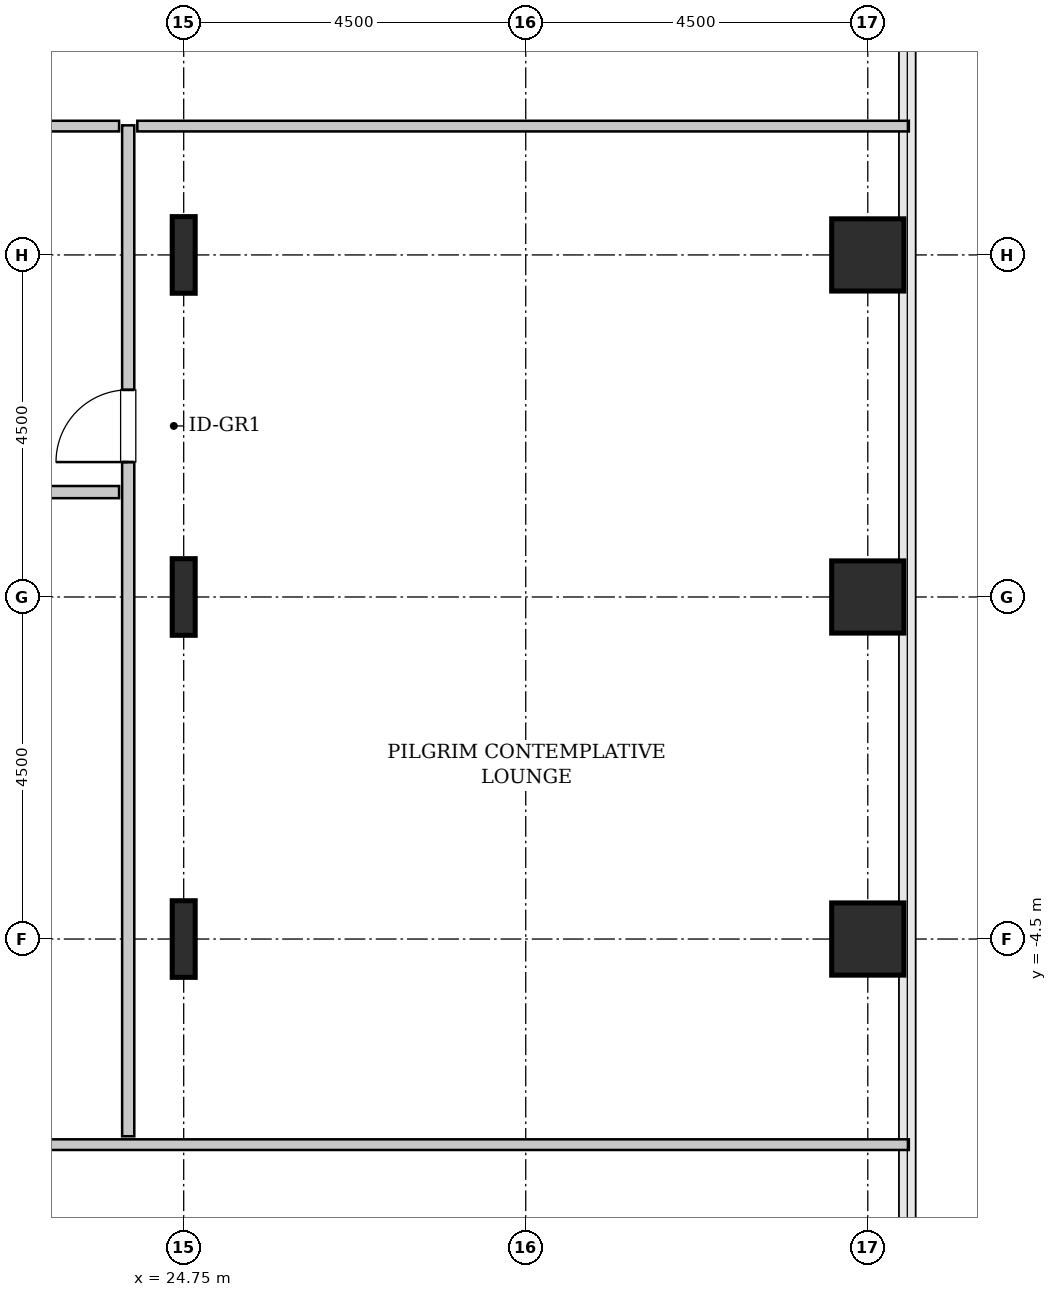
"""IFC4 building model, lengths in metres.
Left out: names, types, materials, properties, quantities, classifications, styles, units other than length and angle.
Written with IfcOpenShell. Run it as: python <this file> out.ifc"""

import sys

from ifc_helpers import new_model, si_unit, direction, frame, frame_2d, origin, origin_2d, place, context, subcontext, project, spatial, rectangle, hollow_rectangle, i_section, extrude, source, transform, mapped, element, fill, save


model = new_model("IFC4")
c1 = context("Model", 3, precision=1e-05, world=origin(), true_north=direction((0.0, 1.0)))
c2 = subcontext(c1, "Body", "Model", "MODEL_VIEW")
j1 = project(units=[si_unit("LENGTHUNIT", "METRE"), si_unit("PLANEANGLEUNIT", "RADIAN")], contexts=[c1])
p1 = place(None, origin())
s1 = spatial("IfcSite", under=j1, at=p1, CompositionType="ELEMENT")
p2 = place(p1, origin())
s2 = spatial("IfcBuilding", under=s1, at=p2, CompositionType="ELEMENT")
p3 = place(p2, frame((0.0, 0.0, 52.0)))
s3 = spatial("IfcBuildingStorey", under=s2, at=p3, CompositionType="ELEMENT", Elevation=52.0)
m1 = source(origin(), c2, "Body", "SweptSolid", [
    extrude(i_section(OverallWidth=0.302, OverallDepth=1.008, WebThickness=0.021, FlangeThickness=0.04, FilletRadius=0.03, at=origin_2d()), origin(), (0.0, 0.0, 1.0), 3.8),
])
for number, where, z_axis, x_axis in (
    (1, (24.75, -4.5, 0.0), (0.0, 0.0, 1.0), (1.0, 0.0, 0.0)),
    (2, (24.75, 0.0, 0.0), (0.0, 0.0, 1.0), (1.0, 0.0, 0.0)),
    (3, (24.75, 4.5, 0.0), (0.0, 0.0, 1.0), (1.0, 0.0, 0.0)),
):
    element("IfcColumn", number, at=place(p3, frame(where, z_axis=z_axis, x_axis=x_axis)), inside=s3, PredefinedType="COLUMN", context=c2, shape_type="MappedRepresentation", body=[
        mapped(m1, transform((0.0, 0.0, 0.0), x_axis=(1.0, 0.0, 0.0), y_axis=(0.0, 1.0, 0.0), z_axis=(0.0, 0.0, 1.0), scale=1.0)),
    ])
m2 = source(origin(), c2, "Body", "SweptSolid", [
    extrude(hollow_rectangle(XDim=0.95, YDim=0.95, WallThickness=0.045, InnerFilletRadius=0.045, OuterFilletRadius=0.09, at=origin_2d()), origin(), (0.0, 0.0, 1.0), 3.8),
])
for number, where, z_axis, x_axis in (
    (4, (33.75, -4.5, 0.0), (0.0, 0.0, 1.0), (1.0, 0.0, 0.0)),
    (5, (33.75, 0.0, 0.0), (0.0, 0.0, 1.0), (1.0, 0.0, 0.0)),
    (6, (33.75, 4.5, 0.0), (0.0, 0.0, 1.0), (1.0, 0.0, 0.0)),
):
    element("IfcColumn", number, at=place(p3, frame(where, z_axis=z_axis, x_axis=x_axis)), inside=s3, PredefinedType="COLUMN", context=c2, shape_type="MappedRepresentation", body=[
        mapped(m2, transform((0.0, 0.0, 0.0), x_axis=(1.0, 0.0, 0.0), y_axis=(0.0, 1.0, 0.0), z_axis=(0.0, 0.0, 1.0), scale=1.0)),
    ])
m3 = source(origin(), c2, "Body", "SweptSolid", [
    extrude(rectangle(XDim=20.43, YDim=0.14, at=frame_2d((10.215, 0.0))), origin(), (0.0, 0.0, 1.0), 3.535),
])
p4 = place(p3, frame((13.86, -7.205, 0.0), z_axis=(0.0, 0.0, 1.0), x_axis=(1.0, 0.0, 0.0)))
e7 = element("IfcWall", 7, at=p4, inside=s3, PredefinedType="PARTITIONING", context=c2, shape_type="MappedRepresentation", body=[
    mapped(m3, transform((0.0, 0.0, 0.0), x_axis=(1.0, 0.0, 0.0), y_axis=(0.0, 1.0, 0.0), z_axis=(0.0, 0.0, 1.0), scale=1.0)),
])
m4 = source(origin(), c2, "Body", "SweptSolid", [
    extrude(rectangle(XDim=13.3, YDim=0.16, at=frame_2d((6.65, 0.0))), origin(), (0.0, 0.0, 1.0), 3.535),
])
p5 = place(p3, frame((24.02, -7.095, 0.0), z_axis=(0.0, 0.0, 1.0), x_axis=(0.0, 1.0, 0.0)))
e8 = element("IfcWall", 8, at=p5, inside=s3, PredefinedType="PARTITIONING", context=c2, shape_type="MappedRepresentation", body=[
    mapped(m4, transform((0.0, 0.0, 0.0), x_axis=(1.0, 0.0, 0.0), y_axis=(0.0, 1.0, 0.0), z_axis=(0.0, 0.0, 1.0), scale=1.0)),
])
p6 = place(p5, frame((8.87, 0.0, 0.0)))
e9 = element("IfcOpeningElement", 9, at=p6, cuts=e8, PredefinedType="OPENING", context=c2, shape_type="SweptSolid", body=[
    extrude(rectangle(XDim=0.95, YDim=2.1, at=frame_2d((0.475, 1.05))), frame((0.0, 0.09, 0.0), z_axis=(0.0, -1.0, 0.0), x_axis=(1.0, 0.0, 0.0)), (0.0, 0.0, 1.0), 0.18),
])
m5 = source(origin(), c2, "Body", "SweptSolid", [
    extrude(rectangle(XDim=10.17, YDim=0.14, at=frame_2d((5.085, 0.0))), origin(), (0.0, 0.0, 1.0), 3.535),
])
p7 = place(p3, frame((13.73, 6.195, 0.0), z_axis=(0.0, 0.0, 1.0), x_axis=(1.0, 0.0, 0.0)))
e10 = element("IfcWall", 10, at=p7, inside=s3, PredefinedType="PARTITIONING", context=c2, shape_type="MappedRepresentation", body=[
    mapped(m5, transform((0.0, 0.0, 0.0), x_axis=(1.0, 0.0, 0.0), y_axis=(0.0, 1.0, 0.0), z_axis=(0.0, 0.0, 1.0), scale=1.0)),
])
m6 = source(origin(), c2, "Body", "SweptSolid", [
    extrude(rectangle(XDim=10.15, YDim=0.14, at=frame_2d((5.075, 0.0))), origin(), (0.0, 0.0, 1.0), 3.535),
])
p8 = place(p3, frame((24.14, 6.195, 0.0), z_axis=(0.0, 0.0, 1.0), x_axis=(1.0, 0.0, 0.0)))
e11 = element("IfcWall", 11, at=p8, inside=s3, PredefinedType="PARTITIONING", context=c2, shape_type="MappedRepresentation", body=[
    mapped(m6, transform((0.0, 0.0, 0.0), x_axis=(1.0, 0.0, 0.0), y_axis=(0.0, 1.0, 0.0), z_axis=(0.0, 0.0, 1.0), scale=1.0)),
])
m7 = source(origin(), c2, "Body", "SweptSolid", [
    extrude(rectangle(XDim=5.045, YDim=0.16, at=frame_2d((2.522, 0.0))), origin(), (0.0, 0.0, 1.0), 3.535),
])
p9 = place(p3, frame((18.855, 1.38, 0.0), z_axis=(0.0, 0.0, 1.0), x_axis=(1.0, 0.0, 0.0)))
e12 = element("IfcWall", 12, at=p9, inside=s3, PredefinedType="PARTITIONING", context=c2, shape_type="MappedRepresentation", body=[
    mapped(m7, transform((0.0, 0.0, 0.0), x_axis=(1.0, 0.0, 0.0), y_axis=(0.0, 1.0, 0.0), z_axis=(0.0, 0.0, 1.0), scale=1.0)),
])
p10 = place(p9, frame((2.048, 0.0, 0.0)))
e13 = element("IfcOpeningElement", 13, at=p10, cuts=e12, PredefinedType="OPENING", context=c2, shape_type="SweptSolid", body=[
    extrude(rectangle(XDim=0.95, YDim=2.1, at=frame_2d((0.475, 1.05))), frame((0.0, 0.09, 0.0), z_axis=(0.0, -1.0, 0.0), x_axis=(1.0, 0.0, 0.0)), (0.0, 0.0, 1.0), 0.18),
])
m8 = source(origin(), c2, "Body", "SweptSolid", [
    extrude(rectangle(XDim=0.95, YDim=2.1, at=frame_2d((0.475, 1.05))), frame((0.0, 0.025, 0.0), z_axis=(0.0, -1.0, 0.0), x_axis=(1.0, 0.0, 0.0)), (0.0, 0.0, 1.0), 0.05),
])
p11 = place(p6, origin())
e14 = element("IfcDoor", 14, at=p11, inside=s3, OperationType="SINGLE_SWING_LEFT", PredefinedType="DOOR", context=c2, shape_type="MappedRepresentation", body=[
    mapped(m8, transform((0.0, 0.0, 0.0), x_axis=(1.0, 0.0, 0.0), y_axis=(0.0, 1.0, 0.0), z_axis=(0.0, 0.0, 1.0), scale=1.0)),
])
fill(e9, e14)
save(model, sys.argv[1])
